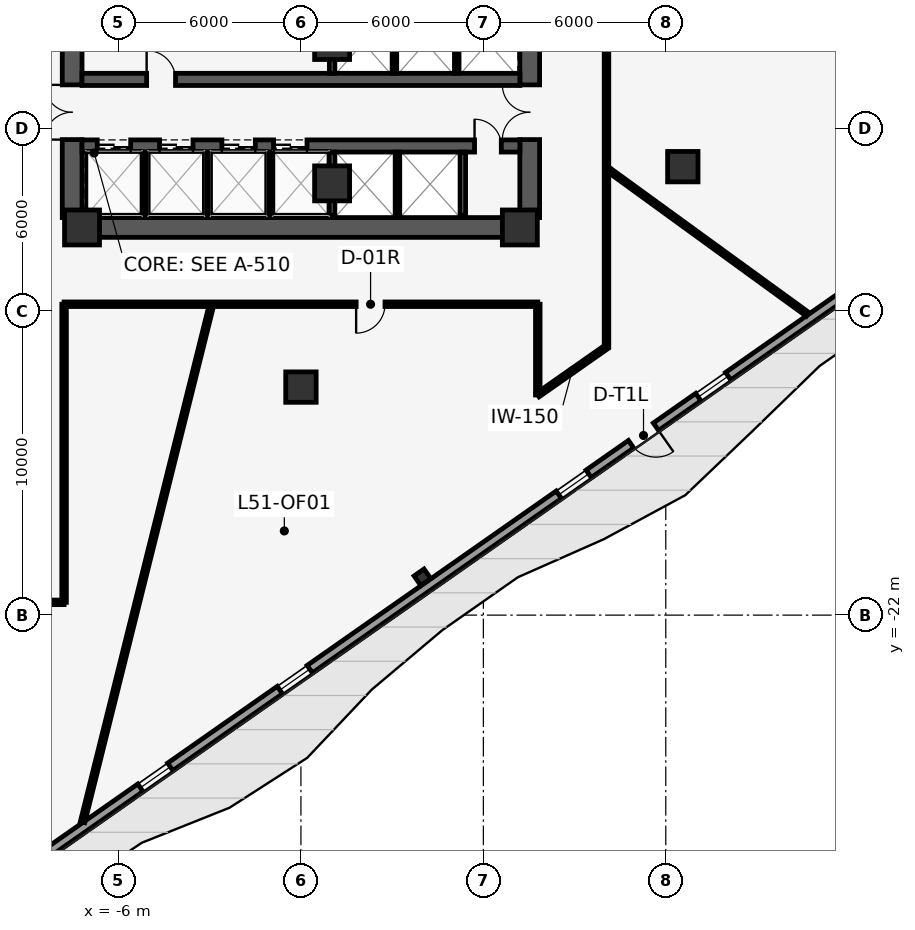
"""IFC4 building model, lengths in metres.
Left out: names, types, materials, properties, quantities, classifications, styles, units other than length and angle.
Written with IfcOpenShell. Run it as: python <this file> out.ifc"""

import sys

from ifc_helpers import new_model, si_unit, direction, frame, frame_2d, origin, origin_2d, place, context, subcontext, project, spatial, rectangle, i_section, extrude, element, fill, save


model = new_model("IFC4")
c1 = context("Model", 3, precision=1e-05, world=origin(), true_north=direction((0.0, 1.0)))
c2 = subcontext(c1, "Body", "Model", "MODEL_VIEW")
j1 = project(units=[si_unit("LENGTHUNIT", "METRE"), si_unit("PLANEANGLEUNIT", "RADIAN")], contexts=[c1])
p1 = place(None, origin())
s1 = spatial("IfcSite", under=j1, at=p1, CompositionType="ELEMENT")
p2 = place(p1, origin())
s2 = spatial("IfcBuilding", under=s1, at=p2, CompositionType="ELEMENT")
p3 = place(p2, frame((0.0, 0.0, 218.8)))
s3 = spatial("IfcBuildingStorey", under=s2, at=p3, CompositionType="ELEMENT", Elevation=218.8)
p4 = place(p3, frame((-7.525, -8.925, 0.0), z_axis=(0.0, 0.0, 1.0), x_axis=(0.0, 1.0, 0.0)))
e1 = element("IfcWall", 1, at=p4, inside=s3, PredefinedType="SHEAR", context=c2, shape_type="SweptSolid", body=[
    extrude(rectangle(XDim=9.025, YDim=0.65, at=frame_2d((4.513, 0.0))), origin(), (0.0, 0.0, 1.0), 3.85),
])
p5 = place(p4, frame((2.565, 0.0, 0.0)))
e2 = element("IfcOpeningElement", 2, at=p5, cuts=e1, PredefinedType="OPENING", context=c2, shape_type="SweptSolid", body=[
    extrude(rectangle(XDim=1.8, YDim=2.2, at=frame_2d((0.9, 1.1))), frame((0.0, 0.335, 0.0), z_axis=(0.0, -1.0, 0.0), x_axis=(1.0, 0.0, 0.0)), (0.0, 0.0, 1.0), 0.67),
])
p6 = place(p4, frame((7.475, 0.0, 0.0)))
e3 = element("IfcOpeningElement", 3, at=p6, cuts=e1, PredefinedType="OPENING", context=c2, shape_type="SweptSolid", body=[
    extrude(rectangle(XDim=1.2, YDim=2.15, at=frame_2d((0.6, 1.075))), frame((0.0, 0.335, 0.0), z_axis=(0.0, -1.0, 0.0), x_axis=(1.0, 0.0, 0.0)), (0.0, 0.0, 1.0), 0.67),
])
p7 = place(p3, frame((7.525, -8.925, 0.0), z_axis=(0.0, 0.0, 1.0), x_axis=(0.0, 1.0, 0.0)))
e4 = element("IfcWall", 4, at=p7, inside=s3, PredefinedType="SHEAR", context=c2, shape_type="SweptSolid", body=[
    extrude(rectangle(XDim=9.025, YDim=0.65, at=frame_2d((4.513, 0.0))), origin(), (0.0, 0.0, 1.0), 3.85),
])
p8 = place(p7, frame((2.565, 0.0, 0.0)))
e5 = element("IfcOpeningElement", 5, at=p8, cuts=e4, PredefinedType="OPENING", context=c2, shape_type="SweptSolid", body=[
    extrude(rectangle(XDim=1.8, YDim=2.2, at=frame_2d((0.9, 1.1))), frame((0.0, 0.335, 0.0), z_axis=(0.0, -1.0, 0.0), x_axis=(1.0, 0.0, 0.0)), (0.0, 0.0, 1.0), 0.67),
])
p9 = place(p7, frame((7.475, 0.0, 0.0)))
e6 = element("IfcOpeningElement", 6, at=p9, cuts=e4, PredefinedType="OPENING", context=c2, shape_type="SweptSolid", body=[
    extrude(rectangle(XDim=1.2, YDim=2.15, at=frame_2d((0.6, 1.075))), frame((0.0, 0.335, 0.0), z_axis=(0.0, -1.0, 0.0), x_axis=(1.0, 0.0, 0.0)), (0.0, 0.0, 1.0), 0.67),
])
p10 = place(p3, frame((-7.525, -9.25, 0.0), z_axis=(0.0, 0.0, 1.0), x_axis=(1.0, 0.0, 0.0)))
e7 = element("IfcWall", 7, at=p10, inside=s3, PredefinedType="SHEAR", context=c2, shape_type="SweptSolid", body=[
    extrude(rectangle(XDim=15.05, YDim=0.65, at=frame_2d((7.525, 0.0))), origin(), (0.0, 0.0, 1.0), 3.85),
])
p11 = place(p3, frame((-7.2, -4.38, 0.0), z_axis=(0.0, 0.0, 1.0), x_axis=(1.0, 0.0, 0.0)))
e8 = element("IfcWall", 8, at=p11, inside=s3, PredefinedType="SHEAR", context=c2, shape_type="SweptSolid", body=[
    extrude(rectangle(XDim=14.4, YDim=0.4, at=frame_2d((7.2, 0.0))), origin(), (0.0, 0.0, 1.0), 3.85),
])
p12 = place(p11, frame((2.125, 0.0, 0.0)))
e9 = element("IfcOpeningElement", 9, at=p12, cuts=e8, PredefinedType="OPENING", context=c2, shape_type="SweptSolid", body=[
    extrude(rectangle(XDim=0.95, YDim=2.15, at=frame_2d((0.475, 1.075))), frame((0.0, 0.21, 0.0), z_axis=(0.0, -1.0, 0.0), x_axis=(1.0, 0.0, 0.0)), (0.0, 0.0, 1.0), 0.42),
])
p13 = place(p3, frame((-7.2, -6.57, 0.0), z_axis=(0.0, 0.0, 1.0), x_axis=(1.0, 0.0, 0.0)))
e10 = element("IfcWall", 10, at=p13, inside=s3, PredefinedType="SHEAR", context=c2, shape_type="SweptSolid", body=[
    extrude(rectangle(XDim=14.4, YDim=0.4, at=frame_2d((7.2, 0.0))), origin(), (0.0, 0.0, 1.0), 3.85),
])
p14 = place(p13, frame((0.5, 0.0, 0.0)))
e11 = element("IfcOpeningElement", 11, at=p14, cuts=e10, PredefinedType="OPENING", context=c2, shape_type="SweptSolid", body=[
    extrude(rectangle(XDim=1.1, YDim=2.2, at=frame_2d((0.55, 1.1))), frame((0.0, 0.21, 0.0), z_axis=(0.0, -1.0, 0.0), x_axis=(1.0, 0.0, 0.0)), (0.0, 0.0, 1.0), 0.42),
])
p15 = place(p13, frame((2.55, 0.0, 0.0)))
e12 = element("IfcOpeningElement", 12, at=p15, cuts=e10, PredefinedType="OPENING", context=c2, shape_type="SweptSolid", body=[
    extrude(rectangle(XDim=1.1, YDim=2.2, at=frame_2d((0.55, 1.1))), frame((0.0, 0.21, 0.0), z_axis=(0.0, -1.0, 0.0), x_axis=(1.0, 0.0, 0.0)), (0.0, 0.0, 1.0), 0.42),
])
p16 = place(p13, frame((4.6, 0.0, 0.0)))
e13 = element("IfcOpeningElement", 13, at=p16, cuts=e10, PredefinedType="OPENING", context=c2, shape_type="SweptSolid", body=[
    extrude(rectangle(XDim=1.1, YDim=2.2, at=frame_2d((0.55, 1.1))), frame((0.0, 0.21, 0.0), z_axis=(0.0, -1.0, 0.0), x_axis=(1.0, 0.0, 0.0)), (0.0, 0.0, 1.0), 0.42),
])
p17 = place(p13, frame((6.3, 0.0, 0.0)))
e14 = element("IfcOpeningElement", 14, at=p17, cuts=e10, PredefinedType="OPENING", context=c2, shape_type="SweptSolid", body=[
    extrude(rectangle(XDim=1.1, YDim=2.2, at=frame_2d((0.55, 1.1))), frame((0.0, 0.21, 0.0), z_axis=(0.0, -1.0, 0.0), x_axis=(1.0, 0.0, 0.0)), (0.0, 0.0, 1.0), 0.42),
])
p18 = place(p13, frame((12.91, 0.0, 0.0)))
e15 = element("IfcOpeningElement", 15, at=p18, cuts=e10, PredefinedType="OPENING", context=c2, shape_type="SweptSolid", body=[
    extrude(rectangle(XDim=0.88, YDim=2.15, at=frame_2d((0.44, 1.075))), frame((0.0, 0.21, 0.0), z_axis=(0.0, -1.0, 0.0), x_axis=(1.0, 0.0, 0.0)), (0.0, 0.0, 1.0), 0.42),
])
for number, where, z_axis, x_axis in (
    (16, (-7.2, -9.25, 0.0), (0.0, 0.0, 1.0), (1.0, 0.0, 0.0)),
    (17, (7.2, -9.25, 0.0), (0.0, 0.0, 1.0), (1.0, 0.0, 0.0)),
    (18, (1.025, -3.15, 0.0), (0.0, 0.0, 1.0), (1.0, 0.0, 0.0)),
    (19, (1.025, -7.8, 0.0), (0.0, 0.0, 1.0), (1.0, 0.0, 0.0)),
):
    element("IfcColumn", number, at=place(p3, frame(where, z_axis=z_axis, x_axis=x_axis)), inside=s3, PredefinedType="COLUMN", context=c2, shape_type="SweptSolid", body=[
        extrude(rectangle(XDim=1.15, YDim=1.15, at=origin_2d()), origin(), (0.0, 0.0, 1.0), 4.1),
    ])
for number, where, z_axis, x_axis in (
    (20, (12.56, -7.25, 0.0), (0.0, 0.0, 1.0), (1.0, 0.0, 0.0)),
    (21, (0.0, -14.5, 0.0), (0.0, 0.0, 1.0), (1.0, 0.0, 0.0)),
):
    element("IfcColumn", number, at=place(p3, frame(where, z_axis=z_axis, x_axis=x_axis)), inside=s3, PredefinedType="COLUMN", context=c2, shape_type="SweptSolid", body=[
        extrude(rectangle(XDim=1.0, YDim=1.0, at=origin_2d()), origin(), (0.0, 0.0, 1.0), 4.1),
    ])
p19 = place(p3, frame((3.996, -20.755, 0.0), z_axis=(0.0, 0.0, 1.0), x_axis=(0.819152044289, 0.573576436351, 0.0)))
e22 = element("IfcColumn", 22, at=p19, inside=s3, PredefinedType="COLUMN", context=c2, shape_type="SweptSolid", body=[
    extrude(i_section(OverallWidth=0.399, OverallDepth=0.386, WebThickness=0.021, FlangeThickness=0.033, at=origin_2d()), origin(), (0.0, 0.0, 1.0), 4.1),
])
p20 = place(p3, frame((32.918, -0.931, 0.0), z_axis=(0.0, 0.0, 1.0), x_axis=(-0.819151415939, -0.573577333727, 0.0)))
e23 = element("IfcWall", 23, at=p20, inside=s3, PredefinedType="STANDARD", context=c2, shape_type="SweptSolid", body=[
    extrude(rectangle(XDim=52.863, YDim=0.3, at=frame_2d((26.431, 0.0))), origin(), (0.0, 0.0, 1.0), 3.85),
])
p21 = place(p20, frame((25.931, 0.0, 0.0)))
e24 = element("IfcOpeningElement", 24, at=p21, cuts=e23, PredefinedType="OPENING", context=c2, shape_type="SweptSolid", body=[
    extrude(rectangle(XDim=1.0, YDim=2.15, at=frame_2d((0.5, 1.075))), frame((0.0, 0.16, 0.0), z_axis=(0.0, -1.0, 0.0), x_axis=(1.0, 0.0, 0.0)), (0.0, 0.0, 1.0), 0.32),
])
p22 = place(p20, frame((6.231, 0.0, 0.85)))
e25 = element("IfcOpeningElement", 25, at=p22, cuts=e23, PredefinedType="OPENING", context=c2, shape_type="SweptSolid", body=[
    extrude(rectangle(XDim=1.2, YDim=2.2, at=frame_2d((0.6, 1.1))), frame((0.0, 0.16, 0.0), z_axis=(0.0, -1.0, 0.0), x_axis=(1.0, 0.0, 0.0)), (0.0, 0.0, 1.0), 0.32),
])
p23 = place(p20, frame((11.831, 0.0, 0.85)))
e26 = element("IfcOpeningElement", 26, at=p23, cuts=e23, PredefinedType="OPENING", context=c2, shape_type="SweptSolid", body=[
    extrude(rectangle(XDim=1.2, YDim=2.2, at=frame_2d((0.6, 1.1))), frame((0.0, 0.16, 0.0), z_axis=(0.0, -1.0, 0.0), x_axis=(1.0, 0.0, 0.0)), (0.0, 0.0, 1.0), 0.32),
])
p24 = place(p20, frame((23.031, 0.0, 0.85)))
e27 = element("IfcOpeningElement", 27, at=p24, cuts=e23, PredefinedType="OPENING", context=c2, shape_type="SweptSolid", body=[
    extrude(rectangle(XDim=1.2, YDim=2.2, at=frame_2d((0.6, 1.1))), frame((0.0, 0.16, 0.0), z_axis=(0.0, -1.0, 0.0), x_axis=(1.0, 0.0, 0.0)), (0.0, 0.0, 1.0), 0.32),
])
p25 = place(p20, frame((28.631, 0.0, 0.85)))
e28 = element("IfcOpeningElement", 28, at=p25, cuts=e23, PredefinedType="OPENING", context=c2, shape_type="SweptSolid", body=[
    extrude(rectangle(XDim=1.2, YDim=2.2, at=frame_2d((0.6, 1.1))), frame((0.0, 0.16, 0.0), z_axis=(0.0, -1.0, 0.0), x_axis=(1.0, 0.0, 0.0)), (0.0, 0.0, 1.0), 0.32),
])
p26 = place(p20, frame((39.831, 0.0, 0.85)))
e29 = element("IfcOpeningElement", 29, at=p26, cuts=e23, PredefinedType="OPENING", context=c2, shape_type="SweptSolid", body=[
    extrude(rectangle(XDim=1.2, YDim=2.2, at=frame_2d((0.6, 1.1))), frame((0.0, 0.16, 0.0), z_axis=(0.0, -1.0, 0.0), x_axis=(1.0, 0.0, 0.0)), (0.0, 0.0, 1.0), 0.32),
])
p27 = place(p20, frame((45.431, 0.0, 0.85)))
e30 = element("IfcOpeningElement", 30, at=p27, cuts=e23, PredefinedType="OPENING", context=c2, shape_type="SweptSolid", body=[
    extrude(rectangle(XDim=1.2, YDim=2.2, at=frame_2d((0.6, 1.1))), frame((0.0, 0.16, 0.0), z_axis=(0.0, -1.0, 0.0), x_axis=(1.0, 0.0, 0.0)), (0.0, 0.0, 1.0), 0.32),
])
p28 = place(p3, frame((1.025, -4.18, 0.0), z_axis=(0.0, 0.0, 1.0), x_axis=(0.0, 1.0, 0.0)))
e31 = element("IfcWall", 31, at=p28, inside=s3, PredefinedType="PARTITIONING", context=c2, shape_type="SweptSolid", body=[
    extrude(rectangle(XDim=2.03, YDim=0.18, at=frame_2d((1.015, 0.0))), origin(), (0.0, 0.0, 1.0), 2.898),
])
for number, where, z_axis, x_axis in (
    (32, (3.075, -4.18, 0.0), (0.0, 0.0, 1.0), (0.0, 1.0, 0.0)),
    (33, (5.125, -4.18, 0.0), (0.0, 0.0, 1.0), (0.0, 1.0, 0.0)),
):
    element("IfcWall", number, at=place(p3, frame(where, z_axis=z_axis, x_axis=x_axis)), inside=s3, PredefinedType="PARTITIONING", context=c2, shape_type="SweptSolid", body=[
        extrude(rectangle(XDim=2.03, YDim=0.15, at=frame_2d((1.015, 0.0))), origin(), (0.0, 0.0, 1.0), 3.85),
    ])
for number, where, z_axis, x_axis in (
    (34, (-5.125, -8.85, 0.0), (0.0, 0.0, 1.0), (0.0, 1.0, 0.0)),
    (35, (-3.075, -8.85, 0.0), (0.0, 0.0, 1.0), (0.0, 1.0, 0.0)),
    (36, (-1.025, -8.85, 0.0), (0.0, 0.0, 1.0), (0.0, 1.0, 0.0)),
):
    element("IfcWall", number, at=place(p3, frame(where, z_axis=z_axis, x_axis=x_axis)), inside=s3, PredefinedType="PARTITIONING", context=c2, shape_type="SweptSolid", body=[
        extrude(rectangle(XDim=2.08, YDim=0.15, at=frame_2d((1.04, 0.0))), origin(), (0.0, 0.0, 1.0), 3.85),
    ])
p29 = place(p3, frame((1.025, -8.85, 0.0), z_axis=(0.0, 0.0, 1.0), x_axis=(0.0, 1.0, 0.0)))
e37 = element("IfcWall", 37, at=p29, inside=s3, PredefinedType="PARTITIONING", context=c2, shape_type="SweptSolid", body=[
    extrude(rectangle(XDim=2.08, YDim=0.18, at=frame_2d((1.04, 0.0))), origin(), (0.0, 0.0, 1.0), 2.898),
])
p30 = place(p3, frame((3.175, -8.85, 0.0), z_axis=(0.0, 0.0, 1.0), x_axis=(0.0, 1.0, 0.0)))
e38 = element("IfcWall", 38, at=p30, inside=s3, PredefinedType="PARTITIONING", context=c2, shape_type="SweptSolid", body=[
    extrude(rectangle(XDim=2.08, YDim=0.15, at=frame_2d((1.04, 0.0))), origin(), (0.0, 0.0, 1.0), 3.85),
])
p31 = place(p3, frame((5.325, -8.85, 0.0), z_axis=(0.0, 0.0, 1.0), x_axis=(0.0, 1.0, 0.0)))
e39 = element("IfcWall", 39, at=p31, inside=s3, PredefinedType="PARTITIONING", context=c2, shape_type="SweptSolid", body=[
    extrude(rectangle(XDim=2.08, YDim=0.18, at=frame_2d((1.04, 0.0))), origin(), (0.0, 0.0, 1.0), 3.85),
])
p32 = place(p3, frame((10.05, -13.177, 0.0), z_axis=(0.0, 0.0, 1.0), x_axis=(-0.819144609591, -0.573587054053, 0.0)))
e40 = element("IfcWall", 40, at=p32, inside=s3, PredefinedType="PARTITIONING", context=c2, shape_type="SweptSolid", body=[
    extrude(rectangle(XDim=2.759, YDim=0.15, at=frame_2d((1.379, 0.0))), origin(), (0.0, 0.0, 1.0), 3.85),
])
p33 = place(p3, frame((7.79, -14.76, 0.0), z_axis=(0.0, 0.0, 1.0), x_axis=(0.0, 1.0, 0.0)))
e41 = element("IfcWall", 41, at=p33, inside=s3, PredefinedType="PARTITIONING", context=c2, shape_type="SweptSolid", body=[
    extrude(rectangle(XDim=2.985, YDim=0.15, at=frame_2d((1.493, 0.0))), origin(), (0.0, 0.0, 1.0), 3.85),
])
p34 = place(p3, frame((7.79, -11.775, 0.0), z_axis=(0.0, 0.0, 1.0), x_axis=(-1.0, 0.0, 0.0)))
e42 = element("IfcWall", 42, at=p34, inside=s3, PredefinedType="PARTITIONING", context=c2, shape_type="SweptSolid", body=[
    extrude(rectangle(XDim=15.58, YDim=0.15, at=frame_2d((7.79, 0.0))), origin(), (0.0, 0.0, 1.0), 3.85),
])
p35 = place(p34, frame((5.025, 0.0, 0.0)))
e43 = element("IfcOpeningElement", 43, at=p35, cuts=e42, PredefinedType="OPENING", context=c2, shape_type="SweptSolid", body=[
    extrude(rectangle(XDim=0.95, YDim=2.15, at=frame_2d((0.475, 1.075))), frame((0.0, 0.085, 0.0), z_axis=(0.0, -1.0, 0.0), x_axis=(1.0, 0.0, 0.0)), (0.0, 0.0, 1.0), 0.17),
])
p36 = place(p3, frame((-7.79, -11.775, 0.0), z_axis=(0.0, 0.0, 1.0), x_axis=(0.0, -1.0, 0.0)))
e44 = element("IfcWall", 44, at=p36, inside=s3, PredefinedType="PARTITIONING", context=c2, shape_type="SweptSolid", body=[
    extrude(rectangle(XDim=9.805, YDim=0.15, at=frame_2d((4.903, 0.0))), origin(), (0.0, 0.0, 1.0), 3.85),
])
p37 = place(p3, frame((-7.79, -21.58, 0.0), z_axis=(0.0, 0.0, 1.0), x_axis=(-1.0, 0.0, 0.0)))
e45 = element("IfcWall", 45, at=p37, inside=s3, PredefinedType="PARTITIONING", context=c2, shape_type="SweptSolid", body=[
    extrude(rectangle(XDim=2.26, YDim=0.15, at=frame_2d((1.13, 0.0))), origin(), (0.0, 0.0, 1.0), 3.85),
])
p38 = place(p3, frame((10.05, -2.13, 0.0), z_axis=(0.0, 0.0, 1.0), x_axis=(0.0, -1.0, 0.0)))
e46 = element("IfcWall", 46, at=p38, inside=s3, PredefinedType="PARTITIONING", context=c2, shape_type="SweptSolid", body=[
    extrude(rectangle(XDim=11.048, YDim=0.15, at=frame_2d((5.524, 0.0))), origin(), (0.0, 0.0, 1.0), 3.85),
])
p39 = place(p3, frame((-2.962, -11.88, 0.0), z_axis=(0.0, 0.0, 1.0), x_axis=(-0.241929751203, -0.97029376762, 0.0)))
e47 = element("IfcWall", 47, at=p39, inside=s3, PredefinedType="PARTITIONING", context=c2, shape_type="SweptSolid", body=[
    extrude(rectangle(XDim=17.447, YDim=0.15, at=frame_2d((8.724, 0.0))), origin(), (0.0, 0.0, 1.0), 3.85),
])
p40 = place(p3, frame((10.155, -7.378, 0.0), z_axis=(0.0, 0.0, 1.0), x_axis=(0.809021931729, -0.587778456548, 0.0)))
e48 = element("IfcWall", 48, at=p40, inside=s3, PredefinedType="PARTITIONING", context=c2, shape_type="SweptSolid", body=[
    extrude(rectangle(XDim=8.049, YDim=0.15, at=frame_2d((4.024, 0.0))), origin(), (0.0, 0.0, 1.0), 3.85),
])
p41 = place(p21, origin())
e49 = element("IfcDoor", 49, at=p41, inside=s3, OperationType="SINGLE_SWING_LEFT", PredefinedType="DOOR", context=c2, shape_type="SweptSolid", body=[
    extrude(rectangle(XDim=1.0, YDim=2.15, at=frame_2d((0.5, 1.075))), frame((0.0, 0.025, 0.0), z_axis=(0.0, -1.0, 0.0), x_axis=(1.0, 0.0, 0.0)), (0.0, 0.0, 1.0), 0.05),
])
fill(e24, e49)
p42 = place(p24, origin())
e50 = element("IfcWindow", 50, at=p42, inside=s3, PartitioningType="SINGLE_PANEL", PredefinedType="WINDOW", context=c2, shape_type="SweptSolid", body=[
    extrude(rectangle(XDim=1.2, YDim=2.2, at=frame_2d((0.6, 1.1))), frame((0.0, 0.03, 0.0), z_axis=(0.0, -1.0, 0.0), x_axis=(1.0, 0.0, 0.0)), (0.0, 0.0, 1.0), 0.06),
])
fill(e27, e50)
p43 = place(p25, origin())
e51 = element("IfcWindow", 51, at=p43, inside=s3, PartitioningType="SINGLE_PANEL", PredefinedType="WINDOW", context=c2, shape_type="SweptSolid", body=[
    extrude(rectangle(XDim=1.2, YDim=2.2, at=frame_2d((0.6, 1.1))), frame((0.0, 0.03, 0.0), z_axis=(0.0, -1.0, 0.0), x_axis=(1.0, 0.0, 0.0)), (0.0, 0.0, 1.0), 0.06),
])
fill(e28, e51)
p44 = place(p26, origin())
e52 = element("IfcWindow", 52, at=p44, inside=s3, PartitioningType="SINGLE_PANEL", PredefinedType="WINDOW", context=c2, shape_type="SweptSolid", body=[
    extrude(rectangle(XDim=1.2, YDim=2.2, at=frame_2d((0.6, 1.1))), frame((0.0, 0.03, 0.0), z_axis=(0.0, -1.0, 0.0), x_axis=(1.0, 0.0, 0.0)), (0.0, 0.0, 1.0), 0.06),
])
fill(e29, e52)
p45 = place(p27, origin())
e53 = element("IfcWindow", 53, at=p45, inside=s3, PartitioningType="SINGLE_PANEL", PredefinedType="WINDOW", context=c2, shape_type="SweptSolid", body=[
    extrude(rectangle(XDim=1.2, YDim=2.2, at=frame_2d((0.6, 1.1))), frame((0.0, 0.03, 0.0), z_axis=(0.0, -1.0, 0.0), x_axis=(1.0, 0.0, 0.0)), (0.0, 0.0, 1.0), 0.06),
])
fill(e30, e53)
p46 = place(p14, origin())
e54 = element("IfcDoor", 54, at=p46, inside=s3, OperationType="DOUBLE_DOOR_SLIDING", PredefinedType="DOOR", context=c2, shape_type="SweptSolid", body=[
    extrude(rectangle(XDim=1.1, YDim=2.2, at=frame_2d((0.55, 1.1))), frame((0.0, 0.025, 0.0), z_axis=(0.0, -1.0, 0.0), x_axis=(1.0, 0.0, 0.0)), (0.0, 0.0, 1.0), 0.05),
])
fill(e11, e54)
p47 = place(p15, origin())
e55 = element("IfcDoor", 55, at=p47, inside=s3, OperationType="DOUBLE_DOOR_SLIDING", PredefinedType="DOOR", context=c2, shape_type="SweptSolid", body=[
    extrude(rectangle(XDim=1.1, YDim=2.2, at=frame_2d((0.55, 1.1))), frame((0.0, 0.025, 0.0), z_axis=(0.0, -1.0, 0.0), x_axis=(1.0, 0.0, 0.0)), (0.0, 0.0, 1.0), 0.05),
])
fill(e12, e55)
p48 = place(p16, origin())
e56 = element("IfcDoor", 56, at=p48, inside=s3, OperationType="DOUBLE_DOOR_SLIDING", PredefinedType="DOOR", context=c2, shape_type="SweptSolid", body=[
    extrude(rectangle(XDim=1.1, YDim=2.2, at=frame_2d((0.55, 1.1))), frame((0.0, 0.025, 0.0), z_axis=(0.0, -1.0, 0.0), x_axis=(1.0, 0.0, 0.0)), (0.0, 0.0, 1.0), 0.05),
])
fill(e13, e56)
p49 = place(p17, origin())
e57 = element("IfcDoor", 57, at=p49, inside=s3, OperationType="DOUBLE_DOOR_SLIDING", PredefinedType="DOOR", context=c2, shape_type="SweptSolid", body=[
    extrude(rectangle(XDim=1.1, YDim=2.2, at=frame_2d((0.55, 1.1))), frame((0.0, 0.025, 0.0), z_axis=(0.0, -1.0, 0.0), x_axis=(1.0, 0.0, 0.0)), (0.0, 0.0, 1.0), 0.05),
])
fill(e14, e57)
p50 = place(p5, origin())
e58 = element("IfcDoor", 58, at=p50, inside=s3, OperationType="DOUBLE_DOOR_SINGLE_SWING", PredefinedType="DOOR", context=c2, shape_type="SweptSolid", body=[
    extrude(rectangle(XDim=1.8, YDim=2.2, at=frame_2d((0.9, 1.1))), frame((0.0, 0.025, 0.0), z_axis=(0.0, -1.0, 0.0), x_axis=(1.0, 0.0, 0.0)), (0.0, 0.0, 1.0), 0.05),
])
fill(e2, e58)
p51 = place(p8, origin())
e59 = element("IfcDoor", 59, at=p51, inside=s3, OperationType="DOUBLE_DOOR_SINGLE_SWING", PredefinedType="DOOR", context=c2, shape_type="SweptSolid", body=[
    extrude(rectangle(XDim=1.8, YDim=2.2, at=frame_2d((0.9, 1.1))), frame((0.0, 0.025, 0.0), z_axis=(0.0, -1.0, 0.0), x_axis=(1.0, 0.0, 0.0)), (0.0, 0.0, 1.0), 0.05),
])
fill(e5, e59)
p52 = place(p12, origin())
e60 = element("IfcDoor", 60, at=p52, inside=s3, OperationType="SINGLE_SWING_LEFT", PredefinedType="DOOR", context=c2, shape_type="SweptSolid", body=[
    extrude(rectangle(XDim=0.95, YDim=2.15, at=frame_2d((0.475, 1.075))), frame((0.0, 0.025, 0.0), z_axis=(0.0, -1.0, 0.0), x_axis=(1.0, 0.0, 0.0)), (0.0, 0.0, 1.0), 0.05),
])
fill(e9, e60)
p53 = place(p18, origin())
e61 = element("IfcDoor", 61, at=p53, inside=s3, OperationType="SINGLE_SWING_LEFT", PredefinedType="DOOR", context=c2, shape_type="SweptSolid", body=[
    extrude(rectangle(XDim=0.88, YDim=2.15, at=frame_2d((0.44, 1.075))), frame((0.0, 0.025, 0.0), z_axis=(0.0, -1.0, 0.0), x_axis=(1.0, 0.0, 0.0)), (0.0, 0.0, 1.0), 0.05),
])
fill(e15, e61)
p54 = place(p35, origin())
e62 = element("IfcDoor", 62, at=p54, inside=s3, OperationType="SINGLE_SWING_RIGHT", PredefinedType="DOOR", context=c2, shape_type="SweptSolid", body=[
    extrude(rectangle(XDim=0.95, YDim=2.15, at=frame_2d((0.475, 1.075))), frame((0.0, 0.025, 0.0), z_axis=(0.0, -1.0, 0.0), x_axis=(1.0, 0.0, 0.0)), (0.0, 0.0, 1.0), 0.05),
])
fill(e43, e62)
save(model, sys.argv[1])
